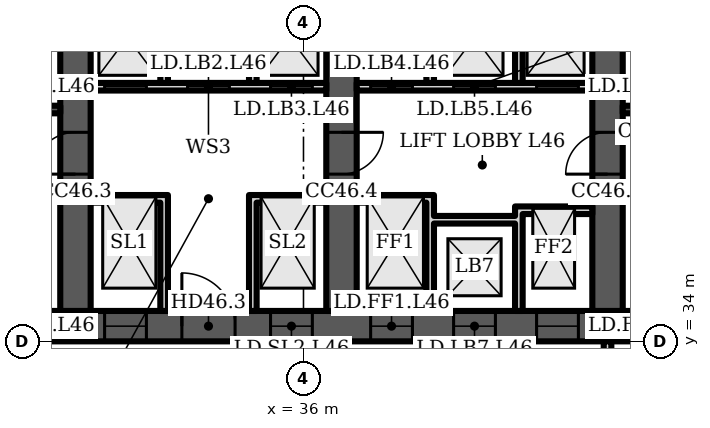
"""IFC4 building model, lengths in metres.
Left out: names, types, materials, properties, quantities, classifications, styles, units other than length and angle.
Written with IfcOpenShell. Run it as: python <this file> out.ifc"""

import sys

from ifc_helpers import new_model, si_unit, direction, frame, frame_2d, origin, place, context, subcontext, project, spatial, polyline, rectangle, outline, extrude, element, fill, save


model = new_model("IFC4")
c1 = context("Model", 3, precision=1e-05, world=origin(), true_north=direction((0.0, 1.0)))
c2 = subcontext(c1, "Body", "Model", "MODEL_VIEW")
j1 = project(units=[si_unit("LENGTHUNIT", "METRE"), si_unit("PLANEANGLEUNIT", "RADIAN")], contexts=[c1])
p1 = place(None, origin())
s1 = spatial("IfcSite", under=j1, at=p1, CompositionType="ELEMENT")
p2 = place(p1, origin())
s2 = spatial("IfcBuilding", under=s1, at=p2, CompositionType="ELEMENT")
p3 = place(p2, frame((0.0, 0.0, 187.9)))
s3 = spatial("IfcBuildingStorey", under=s2, at=p3, CompositionType="ELEMENT", Elevation=187.9)
p4 = place(p3, frame((16.0, 34.4, 0.0), z_axis=(0.0, 0.0, 1.0), x_axis=(1.0, 0.0, 0.0)))
e1 = element("IfcWall", 1, at=p4, inside=s3, PredefinedType="SHEAR", context=c2, shape_type="SweptSolid", body=[
    extrude(rectangle(XDim=42.0, YDim=0.8, at=frame_2d((21.0, 0.0))), origin(), (0.0, 0.0, 1.0), 3.6),
])
p5 = place(p4, frame((3.2, 0.0, 0.0)))
e2 = element("IfcOpeningElement", 2, at=p5, cuts=e1, PredefinedType="OPENING", context=c2, shape_type="SweptSolid", body=[
    extrude(rectangle(XDim=1.0, YDim=2.1, at=frame_2d((0.5, 1.05))), frame((0.0, 0.41, 0.0), z_axis=(0.0, -1.0, 0.0), x_axis=(1.0, 0.0, 0.0)), (0.0, 0.0, 1.0), 0.82),
])
p6 = place(p4, frame((7.65, 0.0, 0.0)))
e3 = element("IfcOpeningElement", 3, at=p6, cuts=e1, PredefinedType="OPENING", context=c2, shape_type="SweptSolid", body=[
    extrude(rectangle(XDim=1.2, YDim=2.1, at=frame_2d((0.6, 1.05))), frame((0.0, 0.41, 0.0), z_axis=(0.0, -1.0, 0.0), x_axis=(1.0, 0.0, 0.0)), (0.0, 0.0, 1.0), 0.82),
])
p7 = place(p4, frame((14.767, 0.0, 0.0)))
e4 = element("IfcOpeningElement", 4, at=p7, cuts=e1, PredefinedType="OPENING", context=c2, shape_type="SweptSolid", body=[
    extrude(rectangle(XDim=1.1, YDim=2.1, at=frame_2d((0.55, 1.05))), frame((0.0, 0.41, 0.0), z_axis=(0.0, -1.0, 0.0), x_axis=(1.0, 0.0, 0.0)), (0.0, 0.0, 1.0), 0.82),
])
p8 = place(p4, frame((19.133, 0.0, 0.0)))
e5 = element("IfcOpeningElement", 5, at=p8, cuts=e1, PredefinedType="OPENING", context=c2, shape_type="SweptSolid", body=[
    extrude(rectangle(XDim=1.1, YDim=2.1, at=frame_2d((0.55, 1.05))), frame((0.0, 0.41, 0.0), z_axis=(0.0, -1.0, 0.0), x_axis=(1.0, 0.0, 0.0)), (0.0, 0.0, 1.0), 0.82),
])
p9 = place(p4, frame((16.8, 0.0, 0.0)))
e6 = element("IfcOpeningElement", 6, at=p9, cuts=e1, PredefinedType="OPENING", context=c2, shape_type="SweptSolid", body=[
    extrude(rectangle(XDim=1.4, YDim=2.1, at=frame_2d((0.7, 1.05))), frame((0.0, 0.41, 0.0), z_axis=(0.0, -1.0, 0.0), x_axis=(1.0, 0.0, 0.0)), (0.0, 0.0, 1.0), 0.82),
])
p10 = place(p4, frame((21.767, 0.0, 0.0)))
e7 = element("IfcOpeningElement", 7, at=p10, cuts=e1, PredefinedType="OPENING", context=c2, shape_type="SweptSolid", body=[
    extrude(rectangle(XDim=1.1, YDim=2.1, at=frame_2d((0.55, 1.05))), frame((0.0, 0.41, 0.0), z_axis=(0.0, -1.0, 0.0), x_axis=(1.0, 0.0, 0.0)), (0.0, 0.0, 1.0), 0.82),
])
p11 = place(p4, frame((23.95, 0.0, 0.0)))
e8 = element("IfcOpeningElement", 8, at=p11, cuts=e1, PredefinedType="OPENING", context=c2, shape_type="SweptSolid", body=[
    extrude(rectangle(XDim=1.1, YDim=2.1, at=frame_2d((0.55, 1.05))), frame((0.0, 0.41, 0.0), z_axis=(0.0, -1.0, 0.0), x_axis=(1.0, 0.0, 0.0)), (0.0, 0.0, 1.0), 0.82),
])
p12 = place(p4, frame((26.133, 0.0, 0.0)))
e9 = element("IfcOpeningElement", 9, at=p12, cuts=e1, PredefinedType="OPENING", context=c2, shape_type="SweptSolid", body=[
    extrude(rectangle(XDim=1.1, YDim=2.1, at=frame_2d((0.55, 1.05))), frame((0.0, 0.41, 0.0), z_axis=(0.0, -1.0, 0.0), x_axis=(1.0, 0.0, 0.0)), (0.0, 0.0, 1.0), 0.82),
])
p13 = place(p4, frame((33.15, 0.0, 0.0)))
e10 = element("IfcOpeningElement", 10, at=p13, cuts=e1, PredefinedType="OPENING", context=c2, shape_type="SweptSolid", body=[
    extrude(rectangle(XDim=1.2, YDim=2.1, at=frame_2d((0.6, 1.05))), frame((0.0, 0.41, 0.0), z_axis=(0.0, -1.0, 0.0), x_axis=(1.0, 0.0, 0.0)), (0.0, 0.0, 1.0), 0.82),
])
p14 = place(p4, frame((35.817, 0.0, 0.0)))
e11 = element("IfcOpeningElement", 11, at=p14, cuts=e1, PredefinedType="OPENING", context=c2, shape_type="SweptSolid", body=[
    extrude(rectangle(XDim=1.0, YDim=2.1, at=frame_2d((0.5, 1.05))), frame((0.0, 0.41, 0.0), z_axis=(0.0, -1.0, 0.0), x_axis=(1.0, 0.0, 0.0)), (0.0, 0.0, 1.0), 0.82),
])
p15 = place(p4, frame((39.95, 0.0, 0.0)))
e12 = element("IfcOpeningElement", 12, at=p15, cuts=e1, PredefinedType="OPENING", context=c2, shape_type="SweptSolid", body=[
    extrude(rectangle(XDim=1.0, YDim=2.1, at=frame_2d((0.5, 1.05))), frame((0.0, 0.41, 0.0), z_axis=(0.0, -1.0, 0.0), x_axis=(1.0, 0.0, 0.0)), (0.0, 0.0, 1.0), 0.82),
])
p16 = place(p4, frame((37.767, 0.0, 0.0)))
e13 = element("IfcOpeningElement", 13, at=p16, cuts=e1, PredefinedType="OPENING", context=c2, shape_type="SweptSolid", body=[
    extrude(rectangle(XDim=1.4, YDim=2.1, at=frame_2d((0.7, 1.05))), frame((0.0, 0.41, 0.0), z_axis=(0.0, -1.0, 0.0), x_axis=(1.0, 0.0, 0.0)), (0.0, 0.0, 1.0), 0.82),
])
p17 = place(p3, frame((30.0, 34.8, 0.0), z_axis=(0.0, 0.0, 1.0), x_axis=(0.0, 1.0, 0.0)))
e14 = element("IfcWall", 14, at=p17, inside=s3, PredefinedType="SHEAR", context=c2, shape_type="SweptSolid", body=[
    extrude(rectangle(XDim=14.374, YDim=0.8, at=frame_2d((7.187, 0.0))), origin(), (0.0, 0.0, 1.0), 3.6),
])
p18 = place(p17, frame((3.6, 0.0, 0.0)))
e15 = element("IfcOpeningElement", 15, at=p18, cuts=e14, PredefinedType="OPENING", context=c2, shape_type="SweptSolid", body=[
    extrude(rectangle(XDim=1.1, YDim=2.1, at=frame_2d((0.55, 1.05))), frame((0.0, 0.41, 0.0), z_axis=(0.0, -1.0, 0.0), x_axis=(1.0, 0.0, 0.0)), (0.0, 0.0, 1.0), 0.82),
])
p19 = place(p3, frame((37.0, 34.8, 0.0), z_axis=(0.0, 0.0, 1.0), x_axis=(0.0, 1.0, 0.0)))
e16 = element("IfcWall", 16, at=p19, inside=s3, PredefinedType="SHEAR", context=c2, shape_type="SweptSolid", body=[
    extrude(rectangle(XDim=14.987, YDim=0.8, at=frame_2d((7.493, 0.0))), origin(), (0.0, 0.0, 1.0), 3.6),
])
p20 = place(p19, frame((11.312, 0.0, 0.0)))
e17 = element("IfcOpeningElement", 17, at=p20, cuts=e16, PredefinedType="OPENING", context=c2, shape_type="SweptSolid", body=[
    extrude(rectangle(XDim=1.0, YDim=2.1, at=frame_2d((0.5, 1.05))), frame((0.0, 0.41, 0.0), z_axis=(0.0, -1.0, 0.0), x_axis=(1.0, 0.0, 0.0)), (0.0, 0.0, 1.0), 0.82),
])
p21 = place(p19, frame((3.6, 0.0, 0.0)))
e18 = element("IfcOpeningElement", 18, at=p21, cuts=e16, PredefinedType="OPENING", context=c2, shape_type="SweptSolid", body=[
    extrude(rectangle(XDim=1.1, YDim=2.1, at=frame_2d((0.55, 1.05))), frame((0.0, 0.41, 0.0), z_axis=(0.0, -1.0, 0.0), x_axis=(1.0, 0.0, 0.0)), (0.0, 0.0, 1.0), 0.82),
])
p22 = place(p3, frame((44.0, 34.8, 0.0), z_axis=(0.0, 0.0, 1.0), x_axis=(0.0, 1.0, 0.0)))
e19 = element("IfcWall", 19, at=p22, inside=s3, PredefinedType="SHEAR", context=c2, shape_type="SweptSolid", body=[
    extrude(rectangle(XDim=14.374, YDim=0.8, at=frame_2d((7.187, 0.0))), origin(), (0.0, 0.0, 1.0), 3.6),
])
p23 = place(p22, frame((11.312, 0.0, 0.0)))
e20 = element("IfcOpeningElement", 20, at=p23, cuts=e19, PredefinedType="OPENING", context=c2, shape_type="SweptSolid", body=[
    extrude(rectangle(XDim=1.0, YDim=2.1, at=frame_2d((0.5, 1.05))), frame((0.0, 0.41, 0.0), z_axis=(0.0, -1.0, 0.0), x_axis=(1.0, 0.0, 0.0)), (0.0, 0.0, 1.0), 0.82),
])
p24 = place(p22, frame((3.6, 0.0, 0.0)))
e21 = element("IfcOpeningElement", 21, at=p24, cuts=e19, PredefinedType="OPENING", context=c2, shape_type="SweptSolid", body=[
    extrude(rectangle(XDim=1.1, YDim=2.1, at=frame_2d((0.55, 1.05))), frame((0.0, 0.41, 0.0), z_axis=(0.0, -1.0, 0.0), x_axis=(1.0, 0.0, 0.0)), (0.0, 0.0, 1.0), 0.82),
])
p25 = place(p3, frame((23.4, 40.1, 0.0), z_axis=(0.0, 0.0, 1.0), x_axis=(1.0, 0.0, 0.0)))
e22 = element("IfcWall", 22, at=p25, inside=s3, PredefinedType="SHEAR", context=c2, shape_type="SweptSolid", body=[
    extrude(rectangle(XDim=6.2, YDim=0.2, at=frame_2d((3.1, 0.0))), origin(), (0.0, 0.0, 1.0), 3.2),
])
p26 = place(p25, frame((3.525, 0.0, 0.0)))
e23 = element("IfcOpeningElement", 23, at=p26, cuts=e22, PredefinedType="OPENING", context=c2, shape_type="SweptSolid", body=[
    extrude(rectangle(XDim=1.2, YDim=2.1, at=frame_2d((0.6, 1.05))), frame((0.0, 0.11, 0.0), z_axis=(0.0, -1.0, 0.0), x_axis=(1.0, 0.0, 0.0)), (0.0, 0.0, 1.0), 0.22),
])
p27 = place(p25, frame((0.575, 0.0, 0.0)))
e24 = element("IfcOpeningElement", 24, at=p27, cuts=e22, PredefinedType="OPENING", context=c2, shape_type="SweptSolid", body=[
    extrude(rectangle(XDim=0.9, YDim=2.1, at=frame_2d((0.45, 1.05))), frame((0.0, 0.11, 0.0), z_axis=(0.0, -1.0, 0.0), x_axis=(1.0, 0.0, 0.0)), (0.0, 0.0, 1.0), 0.22),
])
p28 = place(p3, frame((30.4, 40.7, 0.0), z_axis=(0.0, 0.0, 1.0), x_axis=(1.0, 0.0, 0.0)))
e25 = element("IfcWall", 25, at=p28, inside=s3, PredefinedType="PARTITIONING", context=c2, shape_type="SweptSolid", body=[
    extrude(rectangle(XDim=6.2, YDim=0.2, at=frame_2d((3.1, 0.0))), origin(), (0.0, 0.0, 1.0), 3.2),
])
p29 = place(p28, frame((0.367, 0.0, 0.0)))
e26 = element("IfcOpeningElement", 26, at=p29, cuts=e25, PredefinedType="OPENING", context=c2, shape_type="SweptSolid", body=[
    extrude(rectangle(XDim=1.1, YDim=2.1, at=frame_2d((0.55, 1.05))), frame((0.0, 0.11, 0.0), z_axis=(0.0, -1.0, 0.0), x_axis=(1.0, 0.0, 0.0)), (0.0, 0.0, 1.0), 0.22),
])
p30 = place(p28, frame((2.55, 0.0, 0.0)))
e27 = element("IfcOpeningElement", 27, at=p30, cuts=e25, PredefinedType="OPENING", context=c2, shape_type="SweptSolid", body=[
    extrude(rectangle(XDim=1.1, YDim=2.1, at=frame_2d((0.55, 1.05))), frame((0.0, 0.11, 0.0), z_axis=(0.0, -1.0, 0.0), x_axis=(1.0, 0.0, 0.0)), (0.0, 0.0, 1.0), 0.22),
])
p31 = place(p28, frame((4.733, 0.0, 0.0)))
e28 = element("IfcOpeningElement", 28, at=p31, cuts=e25, PredefinedType="OPENING", context=c2, shape_type="SweptSolid", body=[
    extrude(rectangle(XDim=1.1, YDim=2.1, at=frame_2d((0.55, 1.05))), frame((0.0, 0.11, 0.0), z_axis=(0.0, -1.0, 0.0), x_axis=(1.0, 0.0, 0.0)), (0.0, 0.0, 1.0), 0.22),
])
p32 = place(p3, origin())
e29 = element("IfcWall", 29, at=p32, inside=s3, PredefinedType="PARTITIONING", context=c2, shape_type="SweptSolid", body=[
    extrude(outline(polyline([(32.233, 37.65), (30.4, 37.65), (30.4, 37.85), (32.233, 37.85), (32.433, 37.85), (32.433, 34.8), (32.233, 34.8), (32.233, 37.65)])), origin(), (0.0, 0.0, 1.0), 3.2),
])
p33 = place(p3, origin())
e30 = element("IfcWall", 30, at=p33, inside=s3, PredefinedType="PARTITIONING", context=c2, shape_type="SweptSolid", body=[
    extrude(outline(polyline([(34.567, 37.85), (34.767, 37.85), (36.6, 37.85), (36.6, 37.65), (34.767, 37.65), (34.767, 34.8), (34.567, 34.8), (34.567, 37.85)])), origin(), (0.0, 0.0, 1.0), 3.2),
])
p34 = place(p3, origin())
e31 = element("IfcWall", 31, at=p34, inside=s3, PredefinedType="PARTITIONING", context=c2, shape_type="SweptSolid", body=[
    extrude(outline(polyline([(32.433, 40.8), (32.233, 40.8), (32.233, 43.8), (30.4, 43.8), (30.4, 44.0), (36.6, 44.0), (36.6, 43.8), (34.767, 43.8), (34.767, 40.8), (34.567, 40.8), (34.567, 43.8), (32.433, 43.8), (32.433, 40.8)])), origin(), (0.0, 0.0, 1.0), 3.2),
])
p35 = place(p3, frame((37.4, 40.7, 0.0), z_axis=(0.0, 0.0, 1.0), x_axis=(1.0, 0.0, 0.0)))
e32 = element("IfcWall", 32, at=p35, inside=s3, PredefinedType="PARTITIONING", context=c2, shape_type="SweptSolid", body=[
    extrude(rectangle(XDim=6.2, YDim=0.2, at=frame_2d((3.1, 0.0))), origin(), (0.0, 0.0, 1.0), 3.2),
])
p36 = place(p35, frame((0.367, 0.0, 0.0)))
e33 = element("IfcOpeningElement", 33, at=p36, cuts=e32, PredefinedType="OPENING", context=c2, shape_type="SweptSolid", body=[
    extrude(rectangle(XDim=1.1, YDim=2.1, at=frame_2d((0.55, 1.05))), frame((0.0, 0.11, 0.0), z_axis=(0.0, -1.0, 0.0), x_axis=(1.0, 0.0, 0.0)), (0.0, 0.0, 1.0), 0.22),
])
p37 = place(p35, frame((2.55, 0.0, 0.0)))
e34 = element("IfcOpeningElement", 34, at=p37, cuts=e32, PredefinedType="OPENING", context=c2, shape_type="SweptSolid", body=[
    extrude(rectangle(XDim=1.1, YDim=2.1, at=frame_2d((0.55, 1.05))), frame((0.0, 0.11, 0.0), z_axis=(0.0, -1.0, 0.0), x_axis=(1.0, 0.0, 0.0)), (0.0, 0.0, 1.0), 0.22),
])
p38 = place(p35, frame((4.733, 0.0, 0.0)))
e35 = element("IfcOpeningElement", 35, at=p38, cuts=e32, PredefinedType="OPENING", context=c2, shape_type="SweptSolid", body=[
    extrude(rectangle(XDim=1.1, YDim=2.1, at=frame_2d((0.55, 1.05))), frame((0.0, 0.11, 0.0), z_axis=(0.0, -1.0, 0.0), x_axis=(1.0, 0.0, 0.0)), (0.0, 0.0, 1.0), 0.22),
])
p39 = place(p3, origin())
e36 = element("IfcWall", 36, at=p39, inside=s3, PredefinedType="PARTITIONING", context=c2, shape_type="SweptSolid", body=[
    extrude(outline(polyline([(41.567, 37.1), (39.433, 37.1), (39.433, 34.8), (39.233, 34.8), (39.233, 37.65), (37.4, 37.65), (37.4, 37.85), (39.233, 37.85), (39.433, 37.85), (39.433, 37.3), (41.567, 37.3), (41.567, 37.55), (41.767, 37.55), (43.6, 37.55), (43.6, 37.35), (41.767, 37.35), (41.767, 34.8), (41.567, 34.8), (41.567, 37.1)])), origin(), (0.0, 0.0, 1.0), 3.2),
])
p40 = place(p3, origin())
e37 = element("IfcWall", 37, at=p40, inside=s3, PredefinedType="PARTITIONING", context=c2, shape_type="SweptSolid", body=[
    extrude(outline(polyline([(39.433, 40.8), (39.233, 40.8), (39.233, 43.8), (37.4, 43.8), (37.4, 44.0), (43.6, 44.0), (43.6, 43.8), (41.767, 43.8), (41.767, 40.8), (41.567, 40.8), (41.567, 43.8), (39.433, 43.8), (39.433, 40.8)])), origin(), (0.0, 0.0, 1.0), 3.2),
])
p41 = place(p3, frame((44.4, 40.1, 0.0), z_axis=(0.0, 0.0, 1.0), x_axis=(1.0, 0.0, 0.0)))
e38 = element("IfcWall", 38, at=p41, inside=s3, PredefinedType="SHEAR", context=c2, shape_type="SweptSolid", body=[
    extrude(rectangle(XDim=6.2, YDim=0.2, at=frame_2d((3.1, 0.0))), origin(), (0.0, 0.0, 1.0), 3.2),
])
p42 = place(p41, frame((3.525, 0.0, 0.0)))
e39 = element("IfcOpeningElement", 39, at=p42, cuts=e38, PredefinedType="OPENING", context=c2, shape_type="SweptSolid", body=[
    extrude(rectangle(XDim=1.2, YDim=2.1, at=frame_2d((0.6, 1.05))), frame((0.0, 0.11, 0.0), z_axis=(0.0, -1.0, 0.0), x_axis=(1.0, 0.0, 0.0)), (0.0, 0.0, 1.0), 0.22),
])
p43 = place(p41, frame((0.575, 0.0, 0.0)))
e40 = element("IfcOpeningElement", 40, at=p43, cuts=e38, PredefinedType="OPENING", context=c2, shape_type="SweptSolid", body=[
    extrude(rectangle(XDim=0.9, YDim=2.1, at=frame_2d((0.45, 1.05))), frame((0.0, 0.11, 0.0), z_axis=(0.0, -1.0, 0.0), x_axis=(1.0, 0.0, 0.0)), (0.0, 0.0, 1.0), 0.22),
])
p44 = place(p3, frame((37.0, 30.5, 0.0), z_axis=(0.0, 0.0, 1.0), x_axis=(0.0, 1.0, 0.0)))
e41 = element("IfcWall", 41, at=p44, inside=s3, PredefinedType="PARTITIONING", context=c2, shape_type="SweptSolid", body=[
    extrude(rectangle(XDim=3.5, YDim=0.2, at=frame_2d((1.75, 0.0))), origin(), (0.0, 0.0, 1.0), 3.2),
])
p45 = place(p44, frame((1.2, 0.0, 0.0)))
e42 = element("IfcOpeningElement", 42, at=p45, cuts=e41, PredefinedType="OPENING", context=c2, shape_type="SweptSolid", body=[
    extrude(rectangle(XDim=1.1, YDim=2.1, at=frame_2d((0.55, 1.05))), frame((0.0, 0.11, 0.0), z_axis=(0.0, -1.0, 0.0), x_axis=(1.0, 0.0, 0.0)), (0.0, 0.0, 1.0), 0.22),
])
for number, where, z_axis, x_axis in (
    (43, (40.0, 30.5, 0.0), (0.0, 0.0, 1.0), (0.0, 1.0, 0.0)),
    (44, (41.0, 30.5, 0.0), (0.0, 0.0, 1.0), (0.0, 1.0, 0.0)),
):
    element("IfcWall", number, at=place(p3, frame(where, z_axis=z_axis, x_axis=x_axis)), inside=s3, PredefinedType="PARTITIONING", context=c2, shape_type="SweptSolid", body=[
        extrude(rectangle(XDim=3.5, YDim=0.2, at=frame_2d((1.75, 0.0))), origin(), (0.0, 0.0, 1.0), 3.2),
    ])
p46 = place(p3, frame((44.0, 30.5, 0.0), z_axis=(0.0, 0.0, 1.0), x_axis=(0.0, 1.0, 0.0)))
e45 = element("IfcWall", 45, at=p46, inside=s3, PredefinedType="PARTITIONING", context=c2, shape_type="SweptSolid", body=[
    extrude(rectangle(XDim=3.5, YDim=0.2, at=frame_2d((1.75, 0.0))), origin(), (0.0, 0.0, 1.0), 3.2),
])
p47 = place(p46, frame((1.2, 0.0, 0.0)))
e46 = element("IfcOpeningElement", 46, at=p47, cuts=e45, PredefinedType="OPENING", context=c2, shape_type="SweptSolid", body=[
    extrude(rectangle(XDim=1.1, YDim=2.1, at=frame_2d((0.55, 1.05))), frame((0.0, 0.11, 0.0), z_axis=(0.0, -1.0, 0.0), x_axis=(1.0, 0.0, 0.0)), (0.0, 0.0, 1.0), 0.22),
])
p48 = place(p7, origin())
e47 = element("IfcDoor", 47, at=p48, inside=s3, OperationType="DOUBLE_DOOR_SLIDING", PredefinedType="DOOR", context=c2, shape_type="SweptSolid", body=[
    extrude(rectangle(XDim=1.1, YDim=2.1, at=frame_2d((0.55, 1.05))), frame((0.0, 0.025, 0.0), z_axis=(0.0, -1.0, 0.0), x_axis=(1.0, 0.0, 0.0)), (0.0, 0.0, 1.0), 0.05),
])
fill(e4, e47)
p49 = place(p8, origin())
e48 = element("IfcDoor", 48, at=p49, inside=s3, OperationType="DOUBLE_DOOR_SLIDING", PredefinedType="DOOR", context=c2, shape_type="SweptSolid", body=[
    extrude(rectangle(XDim=1.1, YDim=2.1, at=frame_2d((0.55, 1.05))), frame((0.0, 0.025, 0.0), z_axis=(0.0, -1.0, 0.0), x_axis=(1.0, 0.0, 0.0)), (0.0, 0.0, 1.0), 0.05),
])
fill(e5, e48)
p50 = place(p9, origin())
e49 = element("IfcDoor", 49, at=p50, inside=s3, OperationType="DOUBLE_DOOR_SINGLE_SWING", PredefinedType="DOOR", context=c2, shape_type="SweptSolid", body=[
    extrude(rectangle(XDim=1.4, YDim=2.1, at=frame_2d((0.7, 1.05))), frame((0.0, 0.025, 0.0), z_axis=(0.0, -1.0, 0.0), x_axis=(1.0, 0.0, 0.0)), (0.0, 0.0, 1.0), 0.05),
])
fill(e6, e49)
p51 = place(p29, origin())
e50 = element("IfcDoor", 50, at=p51, inside=s3, OperationType="DOUBLE_DOOR_SLIDING", PredefinedType="DOOR", context=c2, shape_type="SweptSolid", body=[
    extrude(rectangle(XDim=1.1, YDim=2.1, at=frame_2d((0.55, 1.05))), frame((0.0, 0.025, 0.0), z_axis=(0.0, -1.0, 0.0), x_axis=(1.0, 0.0, 0.0)), (0.0, 0.0, 1.0), 0.05),
])
fill(e26, e50)
p52 = place(p30, origin())
e51 = element("IfcDoor", 51, at=p52, inside=s3, OperationType="DOUBLE_DOOR_SLIDING", PredefinedType="DOOR", context=c2, shape_type="SweptSolid", body=[
    extrude(rectangle(XDim=1.1, YDim=2.1, at=frame_2d((0.55, 1.05))), frame((0.0, 0.025, 0.0), z_axis=(0.0, -1.0, 0.0), x_axis=(1.0, 0.0, 0.0)), (0.0, 0.0, 1.0), 0.05),
])
fill(e27, e51)
p53 = place(p31, origin())
e52 = element("IfcDoor", 52, at=p53, inside=s3, OperationType="DOUBLE_DOOR_SLIDING", PredefinedType="DOOR", context=c2, shape_type="SweptSolid", body=[
    extrude(rectangle(XDim=1.1, YDim=2.1, at=frame_2d((0.55, 1.05))), frame((0.0, 0.025, 0.0), z_axis=(0.0, -1.0, 0.0), x_axis=(1.0, 0.0, 0.0)), (0.0, 0.0, 1.0), 0.05),
])
fill(e28, e52)
p54 = place(p10, origin())
e53 = element("IfcDoor", 53, at=p54, inside=s3, OperationType="DOUBLE_DOOR_SLIDING", PredefinedType="DOOR", context=c2, shape_type="SweptSolid", body=[
    extrude(rectangle(XDim=1.1, YDim=2.1, at=frame_2d((0.55, 1.05))), frame((0.0, 0.025, 0.0), z_axis=(0.0, -1.0, 0.0), x_axis=(1.0, 0.0, 0.0)), (0.0, 0.0, 1.0), 0.05),
])
fill(e7, e53)
p55 = place(p11, origin())
e54 = element("IfcDoor", 54, at=p55, inside=s3, OperationType="DOUBLE_DOOR_SLIDING", PredefinedType="DOOR", context=c2, shape_type="SweptSolid", body=[
    extrude(rectangle(XDim=1.1, YDim=2.1, at=frame_2d((0.55, 1.05))), frame((0.0, 0.025, 0.0), z_axis=(0.0, -1.0, 0.0), x_axis=(1.0, 0.0, 0.0)), (0.0, 0.0, 1.0), 0.05),
])
fill(e8, e54)
p56 = place(p12, origin())
e55 = element("IfcDoor", 55, at=p56, inside=s3, OperationType="DOUBLE_DOOR_SLIDING", PredefinedType="DOOR", context=c2, shape_type="SweptSolid", body=[
    extrude(rectangle(XDim=1.1, YDim=2.1, at=frame_2d((0.55, 1.05))), frame((0.0, 0.025, 0.0), z_axis=(0.0, -1.0, 0.0), x_axis=(1.0, 0.0, 0.0)), (0.0, 0.0, 1.0), 0.05),
])
fill(e9, e55)
p57 = place(p36, origin())
e56 = element("IfcDoor", 56, at=p57, inside=s3, OperationType="DOUBLE_DOOR_SLIDING", PredefinedType="DOOR", context=c2, shape_type="SweptSolid", body=[
    extrude(rectangle(XDim=1.1, YDim=2.1, at=frame_2d((0.55, 1.05))), frame((0.0, 0.025, 0.0), z_axis=(0.0, -1.0, 0.0), x_axis=(1.0, 0.0, 0.0)), (0.0, 0.0, 1.0), 0.05),
])
fill(e33, e56)
p58 = place(p37, origin())
e57 = element("IfcDoor", 57, at=p58, inside=s3, OperationType="DOUBLE_DOOR_SLIDING", PredefinedType="DOOR", context=c2, shape_type="SweptSolid", body=[
    extrude(rectangle(XDim=1.1, YDim=2.1, at=frame_2d((0.55, 1.05))), frame((0.0, 0.025, 0.0), z_axis=(0.0, -1.0, 0.0), x_axis=(1.0, 0.0, 0.0)), (0.0, 0.0, 1.0), 0.05),
])
fill(e34, e57)
p59 = place(p38, origin())
e58 = element("IfcDoor", 58, at=p59, inside=s3, OperationType="DOUBLE_DOOR_SLIDING", PredefinedType="DOOR", context=c2, shape_type="SweptSolid", body=[
    extrude(rectangle(XDim=1.1, YDim=2.1, at=frame_2d((0.55, 1.05))), frame((0.0, 0.025, 0.0), z_axis=(0.0, -1.0, 0.0), x_axis=(1.0, 0.0, 0.0)), (0.0, 0.0, 1.0), 0.05),
])
fill(e35, e58)
p60 = place(p18, origin())
e59 = element("IfcDoor", 59, at=p60, inside=s3, OperationType="SINGLE_SWING_LEFT", PredefinedType="DOOR", context=c2, shape_type="SweptSolid", body=[
    extrude(rectangle(XDim=1.1, YDim=2.1, at=frame_2d((0.55, 1.05))), frame((0.0, 0.025, 0.0), z_axis=(0.0, -1.0, 0.0), x_axis=(1.0, 0.0, 0.0)), (0.0, 0.0, 1.0), 0.05),
])
fill(e15, e59)
p61 = place(p21, origin())
e60 = element("IfcDoor", 60, at=p61, inside=s3, OperationType="SINGLE_SWING_RIGHT", PredefinedType="DOOR", context=c2, shape_type="SweptSolid", body=[
    extrude(rectangle(XDim=1.1, YDim=2.1, at=frame_2d((0.55, 1.05))), frame((0.0, 0.025, 0.0), z_axis=(0.0, -1.0, 0.0), x_axis=(1.0, 0.0, 0.0)), (0.0, 0.0, 1.0), 0.05),
])
fill(e18, e60)
p62 = place(p24, origin())
e61 = element("IfcDoor", 61, at=p62, inside=s3, OperationType="SINGLE_SWING_LEFT", PredefinedType="DOOR", context=c2, shape_type="SweptSolid", body=[
    extrude(rectangle(XDim=1.1, YDim=2.1, at=frame_2d((0.55, 1.05))), frame((0.0, 0.025, 0.0), z_axis=(0.0, -1.0, 0.0), x_axis=(1.0, 0.0, 0.0)), (0.0, 0.0, 1.0), 0.05),
])
fill(e21, e61)
save(model, sys.argv[1])
